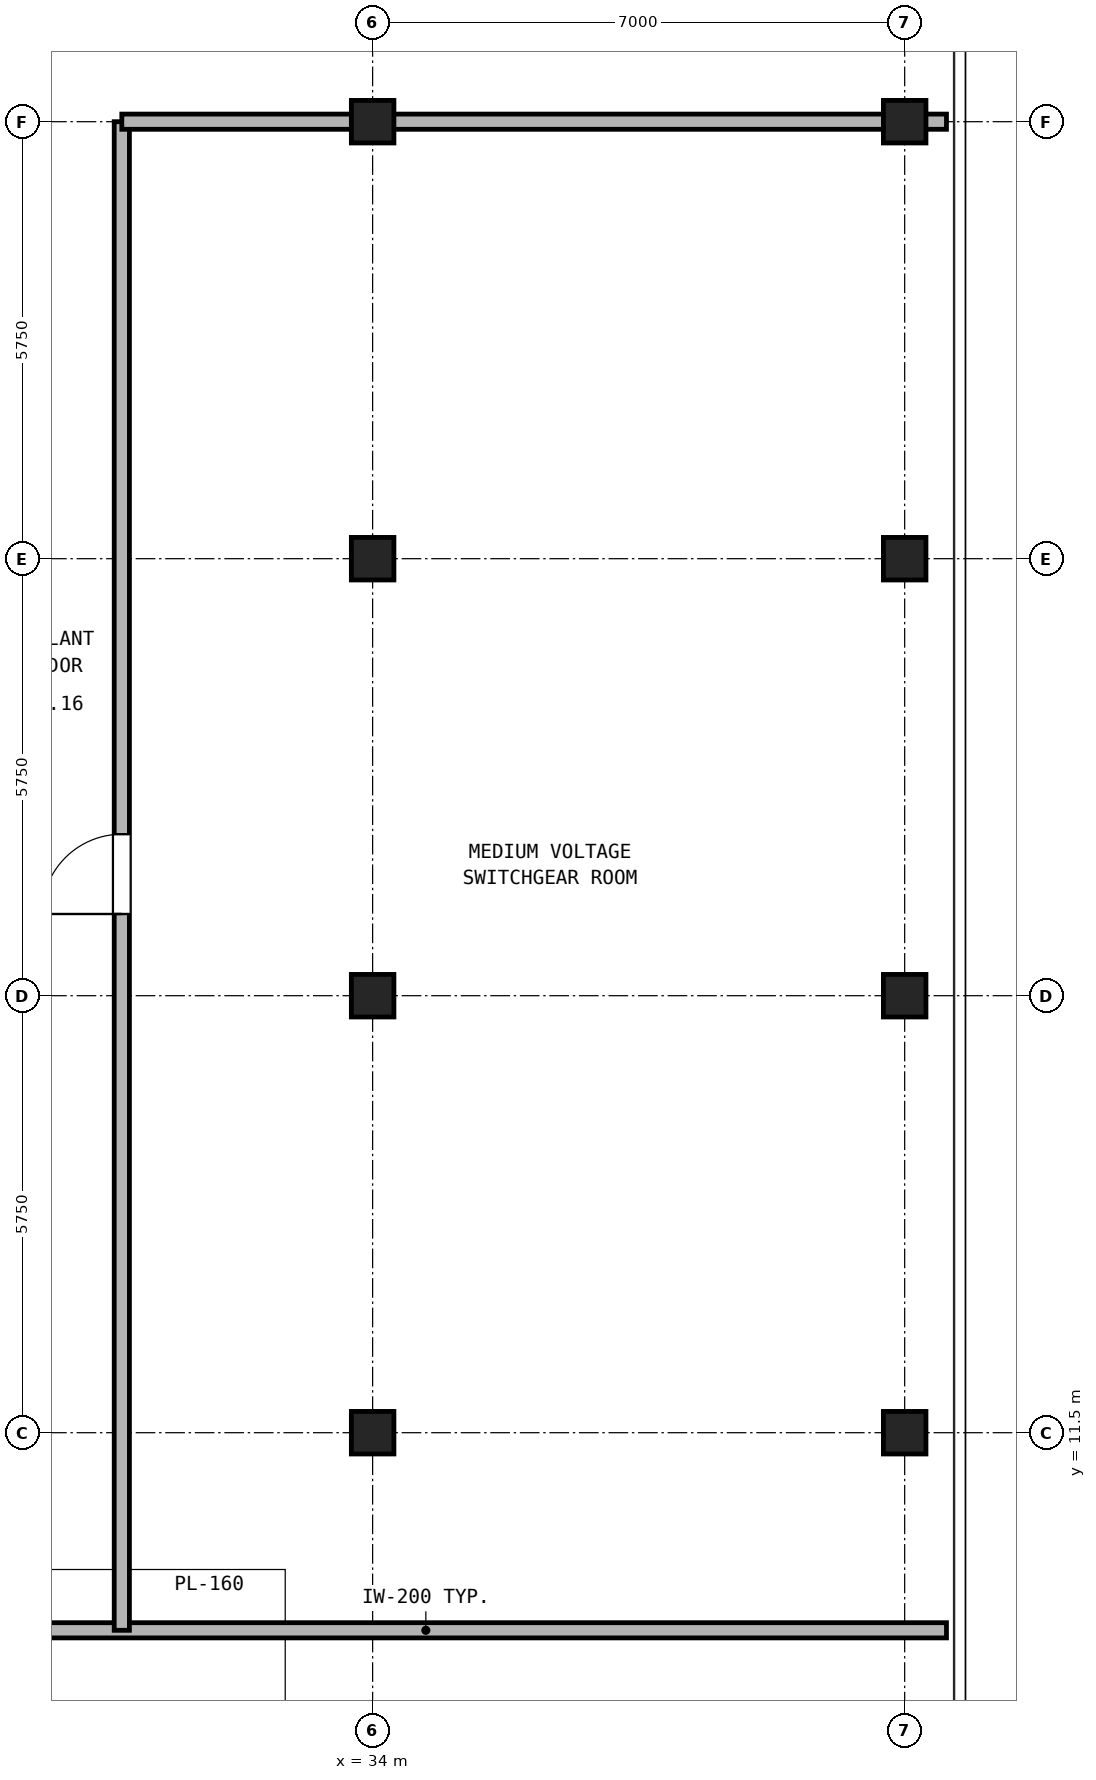
"""IFC4 building model, lengths in metres.
Left out: names, types, materials, properties, quantities, classifications, styles, units other than length and angle.
Written with IfcOpenShell. Run it as: python <this file> out.ifc"""

import sys

from ifc_helpers import new_model, si_unit, direction, frame, frame_2d, origin, origin_2d, place, context, subcontext, project, spatial, rectangle, hollow_rectangle, extrude, source, transform, mapped, element, fill, save


model = new_model("IFC4")
c1 = context("Model", 3, precision=1e-05, world=origin(), true_north=direction((0.0, 1.0)))
c2 = subcontext(c1, "Body", "Model", "MODEL_VIEW")
j1 = project(units=[si_unit("LENGTHUNIT", "METRE"), si_unit("PLANEANGLEUNIT", "RADIAN")], contexts=[c1])
p1 = place(None, origin())
s1 = spatial("IfcSite", under=j1, at=p1, CompositionType="ELEMENT")
p2 = place(p1, origin())
s2 = spatial("IfcBuilding", under=s1, at=p2, CompositionType="ELEMENT")
p3 = place(p2, frame((0.0, 0.0, 274.9)))
s3 = spatial("IfcBuildingStorey", under=s2, at=p3, CompositionType="ELEMENT", Elevation=274.9)
m1 = source(origin(), c2, "Body", "SweptSolid", [
    extrude(hollow_rectangle(XDim=0.56, YDim=0.56, WallThickness=0.03, at=origin_2d()), origin(), (0.0, 0.0, 1.0), 3.38),
])
for number, where, z_axis, x_axis in (
    (1, (41.0, 11.5, 0.0), (0.0, 0.0, 1.0), (1.0, 0.0, 0.0)),
    (2, (41.0, 17.25, 0.0), (0.0, 0.0, 1.0), (1.0, 0.0, 0.0)),
    (3, (41.0, 23.0, 0.0), (0.0, 0.0, 1.0), (1.0, 0.0, 0.0)),
    (4, (41.0, 28.75, 0.0), (0.0, 0.0, 1.0), (1.0, 0.0, 0.0)),
    (5, (34.0, 11.5, 0.0), (0.0, 0.0, 1.0), (1.0, 0.0, 0.0)),
    (6, (34.0, 17.25, 0.0), (0.0, 0.0, 1.0), (1.0, 0.0, 0.0)),
    (7, (34.0, 23.0, 0.0), (0.0, 0.0, 1.0), (1.0, 0.0, 0.0)),
    (8, (34.0, 28.75, 0.0), (0.0, 0.0, 1.0), (1.0, 0.0, 0.0)),
):
    element("IfcColumn", number, at=place(p3, frame(where, z_axis=z_axis, x_axis=x_axis)), inside=s3, PredefinedType="COLUMN", context=c2, shape_type="MappedRepresentation", body=[
        mapped(m1, transform((0.0, 0.0, 0.0), x_axis=(1.0, 0.0, 0.0), y_axis=(0.0, 1.0, 0.0), z_axis=(0.0, 0.0, 1.0), scale=1.0)),
    ])
p4 = place(p3, frame((5.45, 8.9, 0.0), z_axis=(0.0, 0.0, 1.0), x_axis=(1.0, 0.0, 0.0)))
e9 = element("IfcWall", 9, at=p4, inside=s3, PredefinedType="PARTITIONING", context=c2, shape_type="SweptSolid", body=[
    extrude(rectangle(XDim=36.1, YDim=0.2, at=frame_2d((18.05, 0.0))), origin(), (0.0, 0.0, 1.0), 3.38),
])
p5 = place(p4, frame((13.45, 0.0, 0.0)))
e10 = element("IfcOpeningElement", 10, at=p5, cuts=e9, PredefinedType="OPENING", context=c2, shape_type="SweptSolid", body=[
    extrude(rectangle(XDim=1.5, YDim=2.25, at=frame_2d((0.75, 1.125))), frame((0.0, 0.11, 0.0), z_axis=(0.0, -1.0, 0.0), x_axis=(1.0, 0.0, 0.0)), (0.0, 0.0, 1.0), 0.22),
])
p6 = place(p4, frame((20.65, 0.0, 0.0)))
e11 = element("IfcOpeningElement", 11, at=p6, cuts=e9, PredefinedType="OPENING", context=c2, shape_type="SweptSolid", body=[
    extrude(rectangle(XDim=1.5, YDim=2.25, at=frame_2d((0.75, 1.125))), frame((0.0, 0.11, 0.0), z_axis=(0.0, -1.0, 0.0), x_axis=(1.0, 0.0, 0.0)), (0.0, 0.0, 1.0), 0.22),
])
p7 = place(p3, frame((30.7, 8.9, 0.0), z_axis=(0.0, 0.0, 1.0), x_axis=(0.0, 1.0, 0.0)))
e12 = element("IfcWall", 12, at=p7, inside=s3, PredefinedType="PARTITIONING", context=c2, shape_type="SweptSolid", body=[
    extrude(rectangle(XDim=19.85, YDim=0.2, at=frame_2d((9.925, 0.0))), origin(), (0.0, 0.0, 1.0), 3.38),
])
p8 = place(p7, frame((9.425, 0.0, 0.0)))
e13 = element("IfcOpeningElement", 13, at=p8, cuts=e12, PredefinedType="OPENING", context=c2, shape_type="SweptSolid", body=[
    extrude(rectangle(XDim=1.05, YDim=2.15, at=frame_2d((0.525, 1.075))), frame((0.0, 0.11, 0.0), z_axis=(0.0, -1.0, 0.0), x_axis=(1.0, 0.0, 0.0)), (0.0, 0.0, 1.0), 0.22),
])
p9 = place(p3, frame((30.7, 28.75, 0.0), z_axis=(0.0, 0.0, 1.0), x_axis=(1.0, 0.0, 0.0)))
e14 = element("IfcWall", 14, at=p9, inside=s3, PredefinedType="PARTITIONING", context=c2, shape_type="SweptSolid", body=[
    extrude(rectangle(XDim=10.85, YDim=0.2, at=frame_2d((5.425, 0.0))), origin(), (0.0, 0.0, 1.0), 2.905),
])
p10 = place(p8, origin())
e15 = element("IfcDoor", 15, at=p10, inside=s3, OperationType="SINGLE_SWING_LEFT", PredefinedType="DOOR", context=c2, shape_type="SweptSolid", body=[
    extrude(rectangle(XDim=1.05, YDim=2.15, at=frame_2d((0.525, 1.075))), frame((0.0, 0.025, 0.0), z_axis=(0.0, -1.0, 0.0), x_axis=(1.0, 0.0, 0.0)), (0.0, 0.0, 1.0), 0.05),
])
fill(e13, e15)
save(model, sys.argv[1])
